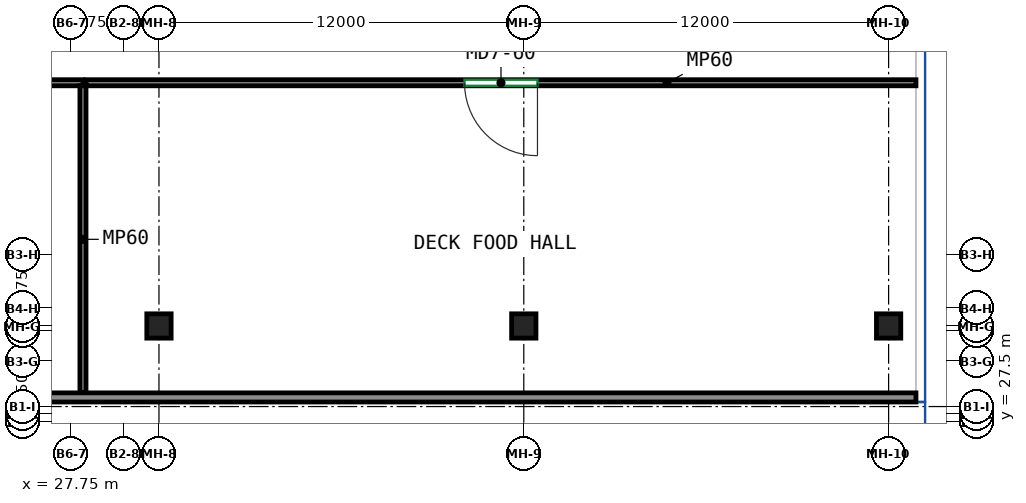
"""IFC4 building model, lengths in metres.
Left out: names, types, materials, properties, quantities, classifications, styles, units other than length and angle.
Written with IfcOpenShell. Run it as: python <this file> out.ifc"""

import sys

from ifc_helpers import new_model, si_unit, direction, frame, frame_2d, origin, origin_2d, place, context, subcontext, project, spatial, rectangle, extrude, source, transform, mapped, element, fill, save


model = new_model("IFC4")
c1 = context("Model", 3, precision=1e-05, world=origin(), true_north=direction((0.0, 1.0)))
c2 = subcontext(c1, "Body", "Model", "MODEL_VIEW")
j1 = project(units=[si_unit("LENGTHUNIT", "METRE"), si_unit("PLANEANGLEUNIT", "RADIAN")], contexts=[c1])
p1 = place(None, origin())
s1 = spatial("IfcSite", under=j1, at=p1, CompositionType="ELEMENT")
p2 = place(p1, origin())
s2 = spatial("IfcBuilding", under=s1, at=p2, CompositionType="ELEMENT")
p3 = place(p2, frame((0.0, 0.0, 9.0)))
s3 = spatial("IfcBuildingStorey", under=s2, at=p3, CompositionType="ELEMENT", Elevation=9.0)
m1 = source(origin(), c2, "Body", "SweptSolid", [
    extrude(rectangle(XDim=0.8, YDim=0.8, at=origin_2d()), origin(), (0.0, 0.0, 1.0), 4.1),
])
for number, where, z_axis, x_axis in (
    (1, (30.65, 30.65, 0.0), (0.0, 0.0, 1.0), (1.0, 0.0, 0.0)),
    (2, (42.65, 30.65, 0.0), (0.0, 0.0, 1.0), (1.0, 0.0, 0.0)),
    (3, (54.65, 30.65, 0.0), (0.0, 0.0, 1.0), (1.0, 0.0, 0.0)),
):
    element("IfcColumn", number, at=place(p3, frame(where, z_axis=z_axis, x_axis=x_axis)), inside=s3, PredefinedType="COLUMN", context=c2, shape_type="MappedRepresentation", body=[
        mapped(m1, transform((0.0, 0.0, 0.0))),
    ])
m2 = source(origin(), c2, "Body", "SweptSolid", [
    extrude(rectangle(XDim=28.7, YDim=0.3, at=frame_2d((14.35, 0.0))), origin(), (0.0, 0.0, 1.0), 4.1),
])
p4 = place(p3, frame((55.7, 56.85, 0.0), z_axis=(0.0, 0.0, 1.0), x_axis=(0.0, -1.0, 0.0)))
e4 = element("IfcWall", 4, at=p4, inside=s3, PredefinedType="SOLIDWALL", context=c2, shape_type="MappedRepresentation", body=[
    mapped(m2, transform((0.0, 0.0, 0.0))),
])
p5 = place(p4, frame((3.15, 0.0, 0.9)))
e5 = element("IfcOpeningElement", 5, at=p5, cuts=e4, PredefinedType="OPENING", context=c2, shape_type="SweptSolid", body=[
    extrude(rectangle(XDim=2.4, YDim=1.8, at=frame_2d((1.2, 0.9))), frame((0.0, 0.16, 0.0), z_axis=(0.0, -1.0, 0.0), x_axis=(1.0, 0.0, 0.0)), (0.0, 0.0, 1.0), 0.32),
])
p6 = place(p4, frame((7.15, 0.0, 0.9)))
e6 = element("IfcOpeningElement", 6, at=p6, cuts=e4, PredefinedType="OPENING", context=c2, shape_type="SweptSolid", body=[
    extrude(rectangle(XDim=2.4, YDim=1.8, at=frame_2d((1.2, 0.9))), frame((0.0, 0.16, 0.0), z_axis=(0.0, -1.0, 0.0), x_axis=(1.0, 0.0, 0.0)), (0.0, 0.0, 1.0), 0.32),
])
p7 = place(p4, frame((11.15, 0.0, 0.9)))
e7 = element("IfcOpeningElement", 7, at=p7, cuts=e4, PredefinedType="OPENING", context=c2, shape_type="SweptSolid", body=[
    extrude(rectangle(XDim=2.4, YDim=1.8, at=frame_2d((1.2, 0.9))), frame((0.0, 0.16, 0.0), z_axis=(0.0, -1.0, 0.0), x_axis=(1.0, 0.0, 0.0)), (0.0, 0.0, 1.0), 0.32),
])
p8 = place(p4, frame((15.15, 0.0, 0.9)))
e8 = element("IfcOpeningElement", 8, at=p8, cuts=e4, PredefinedType="OPENING", context=c2, shape_type="SweptSolid", body=[
    extrude(rectangle(XDim=2.4, YDim=1.8, at=frame_2d((1.2, 0.9))), frame((0.0, 0.16, 0.0), z_axis=(0.0, -1.0, 0.0), x_axis=(1.0, 0.0, 0.0)), (0.0, 0.0, 1.0), 0.32),
])
p9 = place(p4, frame((19.15, 0.0, 0.9)))
e9 = element("IfcOpeningElement", 9, at=p9, cuts=e4, PredefinedType="OPENING", context=c2, shape_type="SweptSolid", body=[
    extrude(rectangle(XDim=2.4, YDim=1.8, at=frame_2d((1.2, 0.9))), frame((0.0, 0.16, 0.0), z_axis=(0.0, -1.0, 0.0), x_axis=(1.0, 0.0, 0.0)), (0.0, 0.0, 1.0), 0.32),
])
p10 = place(p4, frame((23.15, 0.0, 0.9)))
e10 = element("IfcOpeningElement", 10, at=p10, cuts=e4, PredefinedType="OPENING", context=c2, shape_type="SweptSolid", body=[
    extrude(rectangle(XDim=2.4, YDim=1.8, at=frame_2d((1.2, 0.9))), frame((0.0, 0.16, 0.0), z_axis=(0.0, -1.0, 0.0), x_axis=(1.0, 0.0, 0.0)), (0.0, 0.0, 1.0), 0.32),
])
m3 = source(origin(), c2, "Body", "SweptSolid", [
    extrude(rectangle(XDim=84.0, YDim=0.3, at=frame_2d((42.0, 0.0))), origin(), (0.0, 0.0, 1.0), 4.1),
])
p11 = place(p3, frame((55.55, 28.3, 0.0), z_axis=(0.0, 0.0, 1.0), x_axis=(-1.0, 0.0, 0.0)))
e11 = element("IfcWall", 11, at=p11, inside=s3, PredefinedType="SOLIDWALL", context=c2, shape_type="MappedRepresentation", body=[
    mapped(m3, transform((0.0, 0.0, 0.0))),
])
m4 = source(origin(), c2, "Body", "SweptSolid", [
    extrude(rectangle(XDim=18.05, YDim=0.2, at=frame_2d((9.025, 0.0))), origin(), (0.0, 0.0, 1.0), 3.2),
])
p12 = place(p3, frame((28.15, 38.65, 0.0), z_axis=(0.0, 0.0, 1.0), x_axis=(-1.0, 0.0, 0.0)))
e12 = element("IfcWall", 12, at=p12, inside=s3, PredefinedType="PARTITIONING", context=c2, shape_type="MappedRepresentation", body=[
    mapped(m4, transform((0.0, 0.0, 0.0))),
])
p13 = place(p12, frame((7.825, 0.0, 0.0)))
e13 = element("IfcOpeningElement", 13, at=p13, cuts=e12, PredefinedType="OPENING", context=c2, shape_type="SweptSolid", body=[
    extrude(rectangle(XDim=2.4, YDim=2.4, at=frame_2d((1.2, 1.2))), frame((0.0, 0.11, 0.0), z_axis=(0.0, -1.0, 0.0), x_axis=(1.0, 0.0, 0.0)), (0.0, 0.0, 1.0), 0.22),
])
m5 = source(origin(), c2, "Body", "SweptSolid", [
    extrude(rectangle(XDim=10.1, YDim=0.2, at=frame_2d((5.05, 0.0))), origin(), (0.0, 0.0, 1.0), 3.2),
])
p14 = place(p3, frame((28.15, 38.55, 0.0), z_axis=(0.0, 0.0, 1.0), x_axis=(0.0, -1.0, 0.0)))
e14 = element("IfcWall", 14, at=p14, inside=s3, PredefinedType="PARTITIONING", context=c2, shape_type="MappedRepresentation", body=[
    mapped(m5, transform((0.0, 0.0, 0.0))),
])
m6 = source(origin(), c2, "Body", "SweptSolid", [
    extrude(rectangle(XDim=27.3, YDim=0.2, at=frame_2d((13.65, 0.0))), origin(), (0.0, 0.0, 1.0), 3.2),
])
p15 = place(p3, frame((55.55, 38.65, 0.0), z_axis=(0.0, 0.0, 1.0), x_axis=(-1.0, 0.0, 0.0)))
e15 = element("IfcWall", 15, at=p15, inside=s3, PredefinedType="PARTITIONING", context=c2, shape_type="MappedRepresentation", body=[
    mapped(m6, transform((0.0, 0.0, 0.0))),
])
p16 = place(p15, frame((12.45, 0.0, 0.0)))
e16 = element("IfcOpeningElement", 16, at=p16, cuts=e15, PredefinedType="OPENING", context=c2, shape_type="SweptSolid", body=[
    extrude(rectangle(XDim=2.4, YDim=2.4, at=frame_2d((1.2, 1.2))), frame((0.0, 0.11, 0.0), z_axis=(0.0, -1.0, 0.0), x_axis=(1.0, 0.0, 0.0)), (0.0, 0.0, 1.0), 0.22),
])
p17 = place(p8, origin())
e17 = element("IfcWindow", 17, at=p17, inside=s3, PartitioningType="SINGLE_PANEL", PredefinedType="WINDOW", context=c2, shape_type="SweptSolid", body=[
    extrude(rectangle(XDim=2.4, YDim=1.8, at=frame_2d((1.2, 0.9))), frame((0.0, 0.03, 0.0), z_axis=(0.0, -1.0, 0.0), x_axis=(1.0, 0.0, 0.0)), (0.0, 0.0, 1.0), 0.06),
])
fill(e8, e17)
p18 = place(p9, origin())
e18 = element("IfcWindow", 18, at=p18, inside=s3, PartitioningType="SINGLE_PANEL", PredefinedType="WINDOW", context=c2, shape_type="SweptSolid", body=[
    extrude(rectangle(XDim=2.4, YDim=1.8, at=frame_2d((1.2, 0.9))), frame((0.0, 0.03, 0.0), z_axis=(0.0, -1.0, 0.0), x_axis=(1.0, 0.0, 0.0)), (0.0, 0.0, 1.0), 0.06),
])
fill(e9, e18)
p19 = place(p10, origin())
e19 = element("IfcWindow", 19, at=p19, inside=s3, PartitioningType="SINGLE_PANEL", PredefinedType="WINDOW", context=c2, shape_type="SweptSolid", body=[
    extrude(rectangle(XDim=2.4, YDim=1.8, at=frame_2d((1.2, 0.9))), frame((0.0, 0.03, 0.0), z_axis=(0.0, -1.0, 0.0), x_axis=(1.0, 0.0, 0.0)), (0.0, 0.0, 1.0), 0.06),
])
fill(e10, e19)
p20 = place(p16, origin())
e20 = element("IfcDoor", 20, at=p20, inside=s3, OperationType="DOUBLE_DOOR_SINGLE_SWING", PredefinedType="DOOR", context=c2, shape_type="SweptSolid", body=[
    extrude(rectangle(XDim=2.4, YDim=2.4, at=frame_2d((1.2, 1.2))), frame((0.0, 0.025, 0.0), z_axis=(0.0, -1.0, 0.0), x_axis=(1.0, 0.0, 0.0)), (0.0, 0.0, 1.0), 0.05),
])
fill(e16, e20)
save(model, sys.argv[1])
